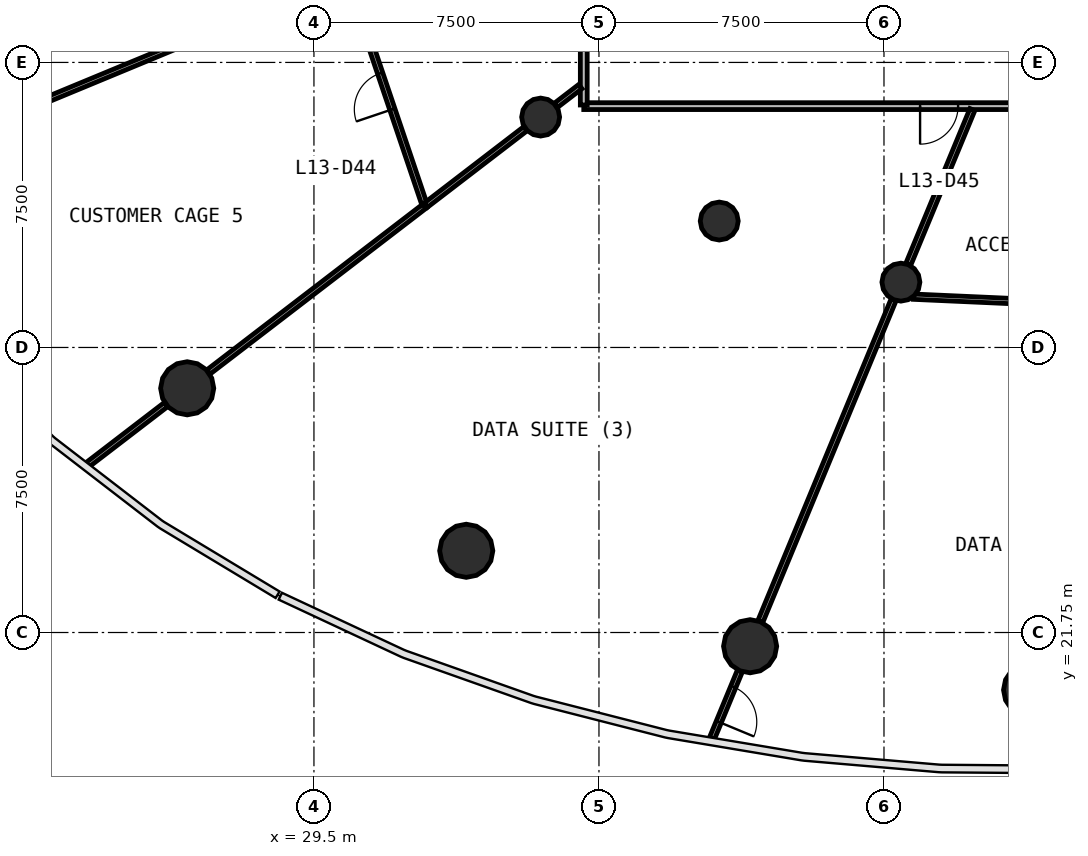
"""IFC4 building model, lengths in metres.
Left out: names, types, materials, properties, quantities, classifications, styles, units other than length and angle.
Written with IfcOpenShell. Run it as: python <this file> out.ifc"""

import sys

from ifc_helpers import new_model, si_unit, direction, frame, frame_2d, origin, origin_2d, place, context, subcontext, project, spatial, rectangle, circle, extrude, source, transform, mapped, element, fill, save


model = new_model("IFC4")
c1 = context("Model", 3, precision=1e-05, world=origin(), true_north=direction((0.0, 1.0)))
c2 = subcontext(c1, "Body", "Model", "MODEL_VIEW")
j1 = project(units=[si_unit("LENGTHUNIT", "METRE"), si_unit("PLANEANGLEUNIT", "RADIAN")], contexts=[c1])
p1 = place(None, origin())
s1 = spatial("IfcSite", under=j1, at=p1, CompositionType="ELEMENT")
p2 = place(p1, origin())
s2 = spatial("IfcBuilding", under=s1, at=p2, CompositionType="ELEMENT")
p3 = place(p2, frame((0.0, 0.0, 57.8)))
s3 = spatial("IfcBuildingStorey", under=s2, at=p3, CompositionType="ELEMENT", Elevation=57.8)
m1 = source(origin(), c2, "Body", "SweptSolid", [
    extrude(circle(Radius=0.7, at=origin_2d()), origin(), (0.0, 0.0, 1.0), 4.4),
])
for number, where, z_axis, x_axis in (
    (1, (26.164, 28.176, 0.0), (0.0, 0.0, 1.0), (1.0, 0.0, 0.0)),
    (2, (33.508, 23.9, 0.0), (0.0, 0.0, 1.0), (1.0, 0.0, 0.0)),
    (3, (40.977, 21.389, 0.0), (0.0, 0.0, 1.0), (1.0, 0.0, 0.0)),
    (4, (48.345, 20.239, 0.0), (0.0, 0.0, 1.0), (1.0, 0.0, 0.0)),
):
    element("IfcColumn", number, at=place(p3, frame(where, z_axis=z_axis, x_axis=x_axis)), inside=s3, PredefinedType="COLUMN", context=c2, shape_type="MappedRepresentation", body=[
        mapped(m1, transform((0.0, 0.0, 0.0), scale=1.0)),
    ])
m2 = source(origin(), c2, "Body", "SweptSolid", [
    extrude(circle(Radius=0.5, at=origin_2d()), origin(), (0.0, 0.0, 1.0), 4.4),
])
for number, where, z_axis, x_axis in (
    (5, (35.465, 35.312, 0.0), (0.0, 0.0, 1.0), (1.0, 0.0, 0.0)),
    (6, (40.165, 32.576, 0.0), (0.0, 0.0, 1.0), (1.0, 0.0, 0.0)),
    (7, (44.945, 30.969, 0.0), (0.0, 0.0, 1.0), (1.0, 0.0, 0.0)),
):
    element("IfcColumn", number, at=place(p3, frame(where, z_axis=z_axis, x_axis=x_axis)), inside=s3, PredefinedType="COLUMN", context=c2, shape_type="MappedRepresentation", body=[
        mapped(m2, transform((0.0, 0.0, 0.0), scale=1.0)),
    ])
p4 = place(p3, frame((67.4, 35.6, 0.0), z_axis=(0.0, 0.0, 1.0), x_axis=(-1.0, 0.0, 0.0)))
e8 = element("IfcWall", 8, at=p4, inside=s3, PredefinedType="PARTITIONING", context=c2, shape_type="SweptSolid", body=[
    extrude(rectangle(XDim=30.8, YDim=0.18, at=frame_2d((15.4, 0.0))), origin(), (0.0, 0.0, 1.0), 3.05),
])
p5 = place(p4, frame((17.25, 0.0, 0.0)))
e9 = element("IfcOpeningElement", 9, at=p5, cuts=e8, PredefinedType="OPENING", context=c2, shape_type="SweptSolid", body=[
    extrude(rectangle(XDim=0.9, YDim=2.1, at=frame_2d((0.45, 1.05))), frame((0.0, 0.1, 0.0), z_axis=(0.0, -1.0, 0.0), x_axis=(1.0, 0.0, 0.0)), (0.0, 0.0, 1.0), 0.2),
])
p6 = place(p4, frame((14.85, 0.0, 0.0)))
e10 = element("IfcOpeningElement", 10, at=p6, cuts=e8, PredefinedType="OPENING", context=c2, shape_type="SweptSolid", body=[
    extrude(rectangle(XDim=0.9, YDim=2.1, at=frame_2d((0.45, 1.05))), frame((0.0, 0.1, 0.0), z_axis=(0.0, -1.0, 0.0), x_axis=(1.0, 0.0, 0.0)), (0.0, 0.0, 1.0), 0.2),
])
p7 = place(p4, frame((12.55, 0.0, 0.0)))
e11 = element("IfcOpeningElement", 11, at=p7, cuts=e8, PredefinedType="OPENING", context=c2, shape_type="SweptSolid", body=[
    extrude(rectangle(XDim=1.0, YDim=2.1, at=frame_2d((0.5, 1.05))), frame((0.0, 0.1, 0.0), z_axis=(0.0, -1.0, 0.0), x_axis=(1.0, 0.0, 0.0)), (0.0, 0.0, 1.0), 0.2),
])
p8 = place(p4, frame((20.95, 0.0, 0.0)))
e12 = element("IfcOpeningElement", 12, at=p8, cuts=e8, PredefinedType="OPENING", context=c2, shape_type="SweptSolid", body=[
    extrude(rectangle(XDim=1.0, YDim=2.1, at=frame_2d((0.5, 1.05))), frame((0.0, 0.1, 0.0), z_axis=(0.0, -1.0, 0.0), x_axis=(1.0, 0.0, 0.0)), (0.0, 0.0, 1.0), 0.2),
])
p9 = place(p3, frame((36.6, 35.63, 0.0), z_axis=(0.0, 0.0, 1.0), x_axis=(0.0, 1.0, 0.0)))
e13 = element("IfcWall", 13, at=p9, inside=s3, PredefinedType="PARTITIONING", context=c2, shape_type="SweptSolid", body=[
    extrude(rectangle(XDim=23.583, YDim=0.18, at=frame_2d((11.791, 0.0))), origin(), (0.0, 0.0, 1.0), 3.05),
])
p10 = place(p9, frame((11.333, 0.0, 0.0)))
e14 = element("IfcOpeningElement", 14, at=p10, cuts=e13, PredefinedType="OPENING", context=c2, shape_type="SweptSolid", body=[
    extrude(rectangle(XDim=1.0, YDim=2.1, at=frame_2d((0.5, 1.05))), frame((0.0, 0.1, 0.0), z_axis=(0.0, -1.0, 0.0), x_axis=(1.0, 0.0, 0.0)), (0.0, 0.0, 1.0), 0.2),
])
p11 = place(p9, frame((9.133, 0.0, 0.0)))
e15 = element("IfcOpeningElement", 15, at=p11, cuts=e13, PredefinedType="OPENING", context=c2, shape_type="SweptSolid", body=[
    extrude(rectangle(XDim=1.0, YDim=2.1, at=frame_2d((0.5, 1.05))), frame((0.0, 0.1, 0.0), z_axis=(0.0, -1.0, 0.0), x_axis=(1.0, 0.0, 0.0)), (0.0, 0.0, 1.0), 0.2),
])
p12 = place(p3, frame((30.371, 39.041, 0.0), z_axis=(0.0, 0.0, 1.0), x_axis=(-0.923880877875, -0.382680184353, 0.0)))
e16 = element("IfcWall", 16, at=p12, inside=s3, PredefinedType="PARTITIONING", context=c2, shape_type="SweptSolid", body=[
    extrude(rectangle(XDim=10.79, YDim=0.14, at=frame_2d((5.395, 0.0))), origin(), (0.0, 0.0, 1.0), 3.05),
])
p13 = place(p3, frame((44.752, 30.502, 0.0), z_axis=(0.0, 0.0, 1.0), x_axis=(-0.382672728165, -0.923883966264, 0.0)))
e17 = element("IfcWall", 17, at=p13, inside=s3, PredefinedType="PARTITIONING", context=c2, shape_type="SweptSolid", body=[
    extrude(rectangle(XDim=9.16, YDim=0.14, at=frame_2d((4.58, 0.0))), origin(), (0.0, 0.0, 1.0), 3.05),
])
p14 = place(p3, frame((32.421, 32.977, 0.0), z_axis=(0.0, 0.0, 1.0), x_axis=(-0.793363922365, -0.608747637933, 0.0)))
e18 = element("IfcWall", 18, at=p14, inside=s3, PredefinedType="PARTITIONING", context=c2, shape_type="SweptSolid", body=[
    extrude(rectangle(XDim=7.182, YDim=0.14, at=frame_2d((3.591, 0.0))), origin(), (0.0, 0.0, 1.0), 3.05),
])
p15 = place(p3, frame((32.412, 33.005, 0.0), z_axis=(0.0, 0.0, 1.0), x_axis=(-0.32021163775, 0.947346033427, 0.0)))
e19 = element("IfcWall", 19, at=p15, inside=s3, PredefinedType="PARTITIONING", context=c2, shape_type="SweptSolid", body=[
    extrude(rectangle(XDim=6.302, YDim=0.14, at=frame_2d((3.151, 0.0))), origin(), (0.0, 0.0, 1.0), 3.05),
])
p16 = place(p15, frame((2.651, 0.0, 0.0)))
e20 = element("IfcOpeningElement", 20, at=p16, cuts=e19, PredefinedType="OPENING", context=c2, shape_type="SweptSolid", body=[
    extrude(rectangle(XDim=1.0, YDim=2.1, at=frame_2d((0.5, 1.05))), frame((0.0, 0.08, 0.0), z_axis=(0.0, -1.0, 0.0), x_axis=(1.0, 0.0, 0.0)), (0.0, 0.0, 1.0), 0.16),
])
p17 = place(p3, frame((46.826, 35.51, 0.0), z_axis=(0.0, 0.0, 1.0), x_axis=(-0.382672831764, -0.923883923353, 0.0)))
e21 = element("IfcWall", 21, at=p17, inside=s3, PredefinedType="PARTITIONING", context=c2, shape_type="SweptSolid", body=[
    extrude(rectangle(XDim=4.41, YDim=0.14, at=frame_2d((2.205, 0.0))), origin(), (0.0, 0.0, 1.0), 3.05),
])
p18 = place(p3, frame((45.275, 30.586, 0.0), z_axis=(0.0, 0.0, 1.0), x_axis=(0.999004449327, -0.044610651473, 0.0)))
e22 = element("IfcWall", 22, at=p18, inside=s3, PredefinedType="PARTITIONING", context=c2, shape_type="SweptSolid", body=[
    extrude(rectangle(XDim=3.918, YDim=0.14, at=frame_2d((1.959, 0.0))), origin(), (0.0, 0.0, 1.0), 3.05),
])
p19 = place(p3, frame((35.065, 35.005, 0.0), z_axis=(0.0, 0.0, 1.0), x_axis=(-0.793324272547, -0.608799308958, 0.0)))
e23 = element("IfcWall", 23, at=p19, inside=s3, PredefinedType="PARTITIONING", context=c2, shape_type="SweptSolid", body=[
    extrude(rectangle(XDim=3.302, YDim=0.14, at=frame_2d((1.651, 0.0))), origin(), (0.0, 0.0, 1.0), 3.05),
])
p20 = place(p3, frame((25.606, 27.747, 0.0), z_axis=(0.0, 0.0, 1.0), x_axis=(-0.793376767289, -0.608730897135, 0.0)))
e24 = element("IfcWall", 24, at=p20, inside=s3, PredefinedType="PARTITIONING", context=c2, shape_type="SweptSolid", body=[
    extrude(rectangle(XDim=2.602, YDim=0.14, at=frame_2d((1.301, 0.0))), origin(), (0.0, 0.0, 1.0), 3.05),
])
p21 = place(p3, frame((40.708, 20.737, 0.0), z_axis=(0.0, 0.0, 1.0), x_axis=(-0.382669186211, -0.923885433333, 0.0)))
e25 = element("IfcWall", 25, at=p21, inside=s3, PredefinedType="PARTITIONING", context=c2, shape_type="SweptSolid", body=[
    extrude(rectangle(XDim=1.925, YDim=0.14, at=frame_2d((0.962, 0.0))), origin(), (0.0, 0.0, 1.0), 3.05),
])
p22 = place(p21, frame((0.45, 0.0, 0.0)))
e26 = element("IfcOpeningElement", 26, at=p22, cuts=e25, PredefinedType="OPENING", context=c2, shape_type="SweptSolid", body=[
    extrude(rectangle(XDim=1.0, YDim=2.1, at=frame_2d((0.5, 1.05))), frame((0.0, 0.08, 0.0), z_axis=(0.0, -1.0, 0.0), x_axis=(1.0, 0.0, 0.0)), (0.0, 0.0, 1.0), 0.16),
])
p23 = place(p3, frame((36.51, 36.114, 0.0), z_axis=(0.0, 0.0, 1.0), x_axis=(-0.793316076519, -0.608809989025, 0.0)))
e27 = element("IfcWall", 27, at=p23, inside=s3, PredefinedType="PARTITIONING", context=c2, shape_type="SweptSolid", body=[
    extrude(rectangle(XDim=0.812, YDim=0.14, at=frame_2d((0.406, 0.0))), origin(), (0.0, 0.0, 1.0), 3.05),
])
m3 = source(origin(), c2, "Body", "SweptSolid", [
    extrude(rectangle(XDim=1.0, YDim=2.1, at=frame_2d((0.5, 1.05))), frame((0.0, 0.025, 0.0), z_axis=(0.0, -1.0, 0.0), x_axis=(1.0, 0.0, 0.0)), (0.0, 0.0, 1.0), 0.05),
])
p24 = place(p22, origin())
e28 = element("IfcDoor", 28, at=p24, inside=s3, OperationType="SINGLE_SWING_RIGHT", PredefinedType="DOOR", context=c2, shape_type="MappedRepresentation", body=[
    mapped(m3, transform((0.0, 0.0, 0.0), scale=1.0)),
])
fill(e26, e28)
p25 = place(p16, origin())
e29 = element("IfcDoor", 29, at=p25, inside=s3, OperationType="SINGLE_SWING_LEFT", PredefinedType="DOOR", context=c2, shape_type="MappedRepresentation", body=[
    mapped(m3, transform((0.0, 0.0, 0.0), scale=1.0)),
])
fill(e20, e29)
p26 = place(p8, origin())
e30 = element("IfcDoor", 30, at=p26, inside=s3, OperationType="SINGLE_SWING_RIGHT", PredefinedType="DOOR", context=c2, shape_type="MappedRepresentation", body=[
    mapped(m3, transform((0.0, 0.0, 0.0), scale=1.0)),
])
fill(e12, e30)
save(model, sys.argv[1])
